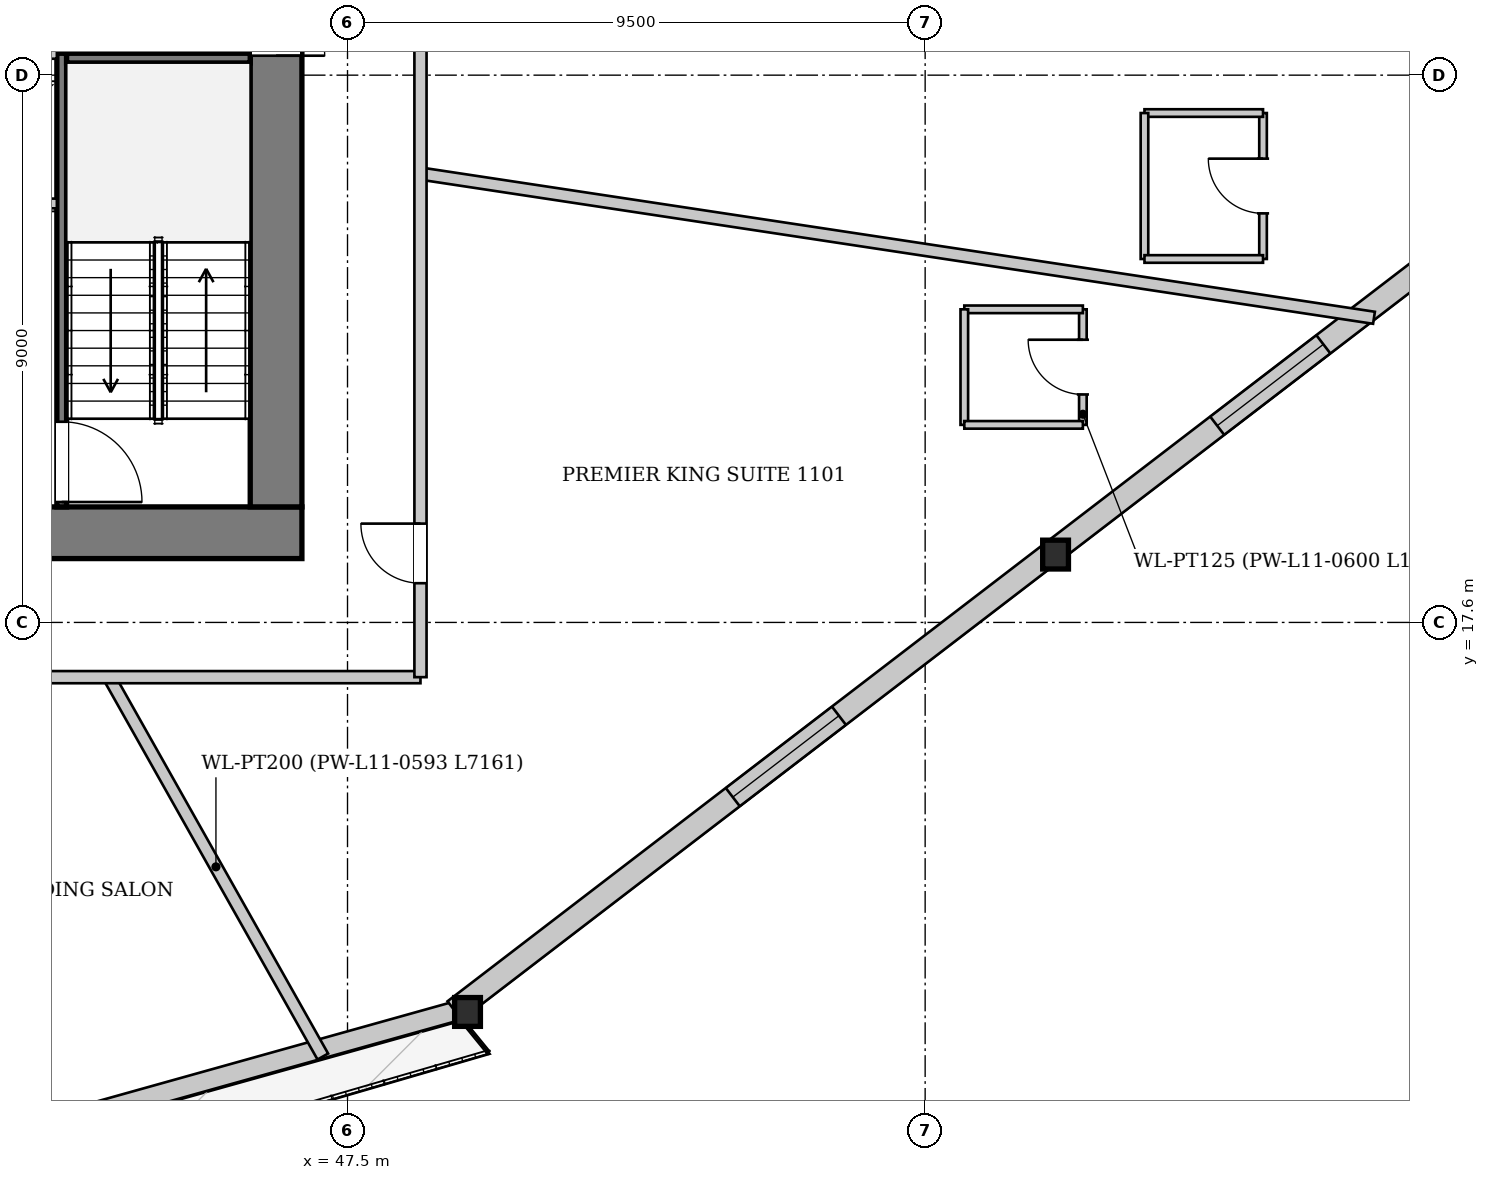
"""IFC4 building model, lengths in metres.
Left out: names, types, materials, properties, quantities, classifications, styles, units other than length and angle.
Written with IfcOpenShell. Run it as: python <this file> out.ifc"""

import sys

from ifc_helpers import new_model, si_unit, direction, frame, frame_2d, origin, origin_2d, place, context, subcontext, project, spatial, rectangle, i_section, extrude, source, transform, mapped, element, fill, save


model = new_model("IFC4")
c1 = context("Model", 3, precision=1e-05, world=origin(), true_north=direction((0.0, 1.0)))
c2 = subcontext(c1, "Body", "Model", "MODEL_VIEW")
j1 = project(units=[si_unit("LENGTHUNIT", "METRE"), si_unit("PLANEANGLEUNIT", "RADIAN")], contexts=[c1])
p1 = place(None, origin())
s1 = spatial("IfcSite", under=j1, at=p1, CompositionType="ELEMENT")
p2 = place(p1, origin())
s2 = spatial("IfcBuilding", under=s1, at=p2, CompositionType="ELEMENT")
p3 = place(p2, frame((0.0, 0.0, 47.05)))
s3 = spatial("IfcBuildingStorey", under=s2, at=p3, CompositionType="ELEMENT", Elevation=47.05)
m1 = source(origin(), c2, "Body", "SweptSolid", [
    extrude(i_section(OverallWidth=0.424, OverallDepth=0.474, WebThickness=0.043, FlangeThickness=0.068, at=origin_2d()), origin(), (0.0, 0.0, 1.0), 3.4),
])
p4 = place(p3, frame((49.376, 11.068, 0.0), z_axis=(0.057730403011, 0.074317123279, 0.995562236003), x_axis=(-0.789721843632, 0.613465084329, 0.0)))
e1 = element("IfcColumn", 1, at=p4, inside=s3, PredefinedType="COLUMN", context=c2, shape_type="MappedRepresentation", body=[
    mapped(m1, transform((0.0, 0.0, 0.0), x_axis=(1.0, 0.0, 0.0), y_axis=(0.0, 1.0, 0.0), z_axis=(0.0, 0.0, 1.0), scale=1.0)),
])
m2 = source(origin(), c2, "Body", "SweptSolid", [
    extrude(i_section(OverallWidth=0.424, OverallDepth=0.474, WebThickness=0.043, FlangeThickness=0.068, at=origin_2d()), origin(), (0.0, 0.0, 1.0), 3.407),
])
p5 = place(p3, frame((59.106, 18.528, 0.0), z_axis=(0.022932240853, 0.110504735609, 0.993610998197), x_axis=(-0.979138604962, 0.203193484817, 0.0)))
e2 = element("IfcColumn", 2, at=p5, inside=s3, PredefinedType="COLUMN", context=c2, shape_type="MappedRepresentation", body=[
    mapped(m2, transform((0.0, 0.0, 0.0), x_axis=(1.0, 0.0, 0.0), y_axis=(0.0, 1.0, 0.0), z_axis=(0.0, 0.0, 1.0), scale=1.0)),
])
p6 = place(p3, frame((49.333, 11.222, 0.0), z_axis=(0.0, 0.0, 1.0), x_axis=(-0.96305403072, -0.269308250734, 0.0)))
e3 = element("IfcWall", 3, at=p6, inside=s3, PredefinedType="SOLIDWALL", context=c2, shape_type="SweptSolid", body=[
    extrude(rectangle(XDim=24.521, YDim=0.32, at=frame_2d((12.261, 0.0))), origin(), (0.0, 0.0, 1.0), 2.592),
])
p7 = place(p6, frame((7.297, 0.0, 0.0)))
e4 = element("IfcOpeningElement", 4, at=p7, cuts=e3, PredefinedType="OPENING", context=c2, shape_type="SweptSolid", body=[
    extrude(rectangle(XDim=1.1, YDim=2.3, at=frame_2d((0.55, 1.15))), frame((0.0, 0.17, 0.0), z_axis=(0.0, -1.0, 0.0), x_axis=(1.0, 0.0, 0.0)), (0.0, 0.0, 1.0), 0.34),
])
p8 = place(p6, frame((17.246, 0.0, 0.272)))
e5 = element("IfcOpeningElement", 5, at=p8, cuts=e3, PredefinedType="OPENING", context=c2, shape_type="SweptSolid", body=[
    extrude(rectangle(XDim=1.8, YDim=2.2, at=frame_2d((0.9, 1.1))), frame((0.0, 0.17, 0.0), z_axis=(0.0, -1.0, 0.0), x_axis=(1.0, 0.0, 0.0)), (0.0, 0.0, 1.0), 0.34),
])
p9 = place(p3, frame((68.72, 26.138, 0.0), z_axis=(0.0, 0.0, 1.0), x_axis=(-0.793606361292, -0.608431543657, 0.0)))
e6 = element("IfcWall", 6, at=p9, inside=s3, PredefinedType="SOLIDWALL", context=c2, shape_type="SweptSolid", body=[
    extrude(rectangle(XDim=24.521, YDim=0.38, at=frame_2d((12.261, 0.0))), origin(), (0.0, 0.0, 1.0), 2.592),
])
p10 = place(p9, frame((6.516, 0.0, 0.222)))
e7 = element("IfcOpeningElement", 7, at=p10, cuts=e6, PredefinedType="OPENING", context=c2, shape_type="SweptSolid", body=[
    extrude(rectangle(XDim=2.2, YDim=2.25, at=frame_2d((1.1, 1.125))), frame((0.0, 0.2, 0.0), z_axis=(0.0, -1.0, 0.0), x_axis=(1.0, 0.0, 0.0)), (0.0, 0.0, 1.0), 0.4),
])
p11 = place(p9, frame((16.555, 0.0, 0.222)))
e8 = element("IfcOpeningElement", 8, at=p11, cuts=e6, PredefinedType="OPENING", context=c2, shape_type="SweptSolid", body=[
    extrude(rectangle(XDim=2.2, YDim=2.25, at=frame_2d((1.1, 1.125))), frame((0.0, 0.2, 0.0), z_axis=(0.0, -1.0, 0.0), x_axis=(1.0, 0.0, 0.0)), (0.0, 0.0, 1.0), 0.4),
])
p12 = place(p3, frame((46.75, 19.075, 0.0), z_axis=(0.0, 0.0, 1.0), x_axis=(-1.0, 0.0, 0.0)))
e9 = element("IfcWall", 9, at=p12, inside=s3, PredefinedType="SHEAR", context=c2, shape_type="SweptSolid", body=[
    extrude(rectangle(XDim=17.5, YDim=0.85, at=frame_2d((8.75, 0.0))), origin(), (0.0, 0.0, 1.0), 3.3),
])
p13 = place(p12, frame((4.95, 0.0, 0.0)))
e10 = element("IfcOpeningElement", 10, at=p13, cuts=e9, PredefinedType="OPENING", context=c2, shape_type="SweptSolid", body=[
    extrude(rectangle(XDim=1.12, YDim=2.25, at=frame_2d((0.56, 1.125))), frame((0.0, 0.435, 0.0), z_axis=(0.0, -1.0, 0.0), x_axis=(1.0, 0.0, 0.0)), (0.0, 0.0, 1.0), 0.87),
])
p14 = place(p12, frame((11.45, 0.0, 0.0)))
e11 = element("IfcOpeningElement", 11, at=p14, cuts=e9, PredefinedType="OPENING", context=c2, shape_type="SweptSolid", body=[
    extrude(rectangle(XDim=1.12, YDim=2.25, at=frame_2d((0.56, 1.125))), frame((0.0, 0.435, 0.0), z_axis=(0.0, -1.0, 0.0), x_axis=(1.0, 0.0, 0.0)), (0.0, 0.0, 1.0), 0.87),
])
p15 = place(p3, frame((46.325, 33.7, 0.0), z_axis=(0.0, 0.0, 1.0), x_axis=(0.0, -1.0, 0.0)))
e12 = element("IfcWall", 12, at=p15, inside=s3, PredefinedType="SHEAR", context=c2, shape_type="SweptSolid", body=[
    extrude(rectangle(XDim=14.2, YDim=0.85, at=frame_2d((7.1, 0.0))), origin(), (0.0, 0.0, 1.0), 3.3),
])
p16 = place(p15, frame((5.18, 0.0, 0.0)))
e13 = element("IfcOpeningElement", 13, at=p16, cuts=e12, PredefinedType="OPENING", context=c2, shape_type="SweptSolid", body=[
    extrude(rectangle(XDim=1.6, YDim=2.2, at=frame_2d((0.8, 1.1))), frame((0.0, 0.435, 0.0), z_axis=(0.0, -1.0, 0.0), x_axis=(1.0, 0.0, 0.0)), (0.0, 0.0, 1.0), 0.87),
])
p17 = place(p3, frame((42.8, 26.96, 0.0), z_axis=(0.0, 0.0, 1.0), x_axis=(0.0, -1.0, 0.0)))
e14 = element("IfcWall", 14, at=p17, inside=s3, PredefinedType="PARTITIONING", context=c2, shape_type="SweptSolid", body=[
    extrude(rectangle(XDim=7.46, YDim=0.16, at=frame_2d((3.73, 0.0))), origin(), (0.0, 0.0, 1.0), 3.3),
])
p18 = place(p17, frame((6.06, 0.0, 0.0)))
e15 = element("IfcOpeningElement", 15, at=p18, cuts=e14, PredefinedType="OPENING", context=c2, shape_type="SweptSolid", body=[
    extrude(rectangle(XDim=1.32, YDim=2.2, at=frame_2d((0.66, 1.1))), frame((0.0, 0.09, 0.0), z_axis=(0.0, -1.0, 0.0), x_axis=(1.0, 0.0, 0.0)), (0.0, 0.0, 1.0), 0.18),
])
p19 = place(p3, frame((42.88, 26.88, 0.0), z_axis=(0.0, 0.0, 1.0), x_axis=(1.0, 0.0, 0.0)))
e16 = element("IfcWall", 16, at=p19, inside=s3, PredefinedType="PARTITIONING", context=c2, shape_type="SweptSolid", body=[
    extrude(rectangle(XDim=3.02, YDim=0.16, at=frame_2d((1.51, 0.0))), origin(), (0.0, 0.0, 1.0), 3.3),
])
p20 = place(p3, frame((33.28, 24.49, 0.0), z_axis=(0.0, 0.0, 1.0), x_axis=(1.0, 0.0, 0.0)))
e17 = element("IfcWall", 17, at=p20, inside=s3, PredefinedType="PARTITIONING", context=c2, shape_type="SweptSolid", body=[
    extrude(rectangle(XDim=9.44, YDim=0.16, at=frame_2d((4.72, 0.0))), origin(), (0.0, 0.0, 1.0), 3.3),
])
p21 = place(p3, frame((33.28, 26.95, 0.0), z_axis=(0.0, 0.0, 1.0), x_axis=(1.0, 0.0, 0.0)))
e18 = element("IfcWall", 18, at=p21, inside=s3, PredefinedType="PARTITIONING", context=c2, shape_type="SweptSolid", body=[
    extrude(rectangle(XDim=9.44, YDim=0.16, at=frame_2d((4.72, 0.0))), origin(), (0.0, 0.0, 1.0), 3.3),
])
p22 = place(p21, frame((0.26, 0.0, 0.0)))
e19 = element("IfcOpeningElement", 19, at=p22, cuts=e18, PredefinedType="OPENING", context=c2, shape_type="SweptSolid", body=[
    extrude(rectangle(XDim=1.1, YDim=2.2, at=frame_2d((0.55, 1.1))), frame((0.0, 0.09, 0.0), z_axis=(0.0, -1.0, 0.0), x_axis=(1.0, 0.0, 0.0)), (0.0, 0.0, 1.0), 0.18),
])
p23 = place(p21, frame((2.01, 0.0, 0.0)))
e20 = element("IfcOpeningElement", 20, at=p23, cuts=e18, PredefinedType="OPENING", context=c2, shape_type="SweptSolid", body=[
    extrude(rectangle(XDim=1.1, YDim=2.2, at=frame_2d((0.55, 1.1))), frame((0.0, 0.09, 0.0), z_axis=(0.0, -1.0, 0.0), x_axis=(1.0, 0.0, 0.0)), (0.0, 0.0, 1.0), 0.18),
])
p24 = place(p21, frame((3.76, 0.0, 0.0)))
e21 = element("IfcOpeningElement", 21, at=p24, cuts=e18, PredefinedType="OPENING", context=c2, shape_type="SweptSolid", body=[
    extrude(rectangle(XDim=1.1, YDim=2.2, at=frame_2d((0.55, 1.1))), frame((0.0, 0.09, 0.0), z_axis=(0.0, -1.0, 0.0), x_axis=(1.0, 0.0, 0.0)), (0.0, 0.0, 1.0), 0.18),
])
p25 = place(p21, frame((5.51, 0.0, 0.0)))
e22 = element("IfcOpeningElement", 22, at=p25, cuts=e18, PredefinedType="OPENING", context=c2, shape_type="SweptSolid", body=[
    extrude(rectangle(XDim=1.1, YDim=2.2, at=frame_2d((0.55, 1.1))), frame((0.0, 0.09, 0.0), z_axis=(0.0, -1.0, 0.0), x_axis=(1.0, 0.0, 0.0)), (0.0, 0.0, 1.0), 0.18),
])
p26 = place(p3, frame((43.578, 16.7, 0.0), z_axis=(0.0, 0.0, 1.0), x_axis=(0.490916627621, -0.871206556865, 0.0)))
e23 = element("IfcWall", 23, at=p26, inside=s3, PredefinedType="PARTITIONING", context=c2, shape_type="SweptSolid", body=[
    extrude(rectangle(XDim=7.161, YDim=0.2, at=frame_2d((3.581, 0.0))), origin(), (0.0, 0.0, 1.0), 3.3),
])
p27 = place(p3, frame((48.7, 24.982, 0.0), z_axis=(0.0, 0.0, 1.0), x_axis=(0.988756783169, -0.149532684514, 0.0)))
e24 = element("IfcWall", 24, at=p27, inside=s3, PredefinedType="PARTITIONING", context=c2, shape_type="SweptSolid", body=[
    extrude(rectangle(XDim=15.86, YDim=0.2, at=frame_2d((7.93, 0.0))), origin(), (0.0, 0.0, 1.0), 3.3),
])
p28 = place(p3, frame((59.594, 20.849, 0.0), z_axis=(0.0, 0.0, 1.0), x_axis=(0.0, 1.0, 0.0)))
e25 = element("IfcWall", 25, at=p28, inside=s3, PredefinedType="PARTITIONING", context=c2, shape_type="SweptSolid", body=[
    extrude(rectangle(XDim=1.9, YDim=0.125, at=frame_2d((0.95, 0.0))), origin(), (0.0, 0.0, 1.0), 3.3),
])
p29 = place(p28, frame((0.5, 0.0, 0.0)))
e26 = element("IfcOpeningElement", 26, at=p29, cuts=e25, PredefinedType="OPENING", context=c2, shape_type="SweptSolid", body=[
    extrude(rectangle(XDim=0.9, YDim=2.1, at=frame_2d((0.45, 1.05))), frame((0.0, 0.073, 0.0), z_axis=(0.0, -1.0, 0.0), x_axis=(1.0, 0.0, 0.0)), (0.0, 0.0, 1.0), 0.145),
])
p30 = place(p3, frame((59.594, 22.749, 0.0), z_axis=(0.0, 0.0, 1.0), x_axis=(-1.0, 0.0, 0.0)))
e27 = element("IfcWall", 27, at=p30, inside=s3, PredefinedType="PARTITIONING", context=c2, shape_type="SweptSolid", body=[
    extrude(rectangle(XDim=1.95, YDim=0.125, at=frame_2d((0.975, 0.0))), origin(), (0.0, 0.0, 1.0), 3.3),
])
p31 = place(p3, frame((57.644, 22.749, 0.0), z_axis=(0.0, 0.0, 1.0), x_axis=(0.0, -1.0, 0.0)))
e28 = element("IfcWall", 28, at=p31, inside=s3, PredefinedType="PARTITIONING", context=c2, shape_type="SweptSolid", body=[
    extrude(rectangle(XDim=1.9, YDim=0.125, at=frame_2d((0.95, 0.0))), origin(), (0.0, 0.0, 1.0), 3.3),
])
p32 = place(p3, frame((57.644, 20.849, 0.0), z_axis=(0.0, 0.0, 1.0), x_axis=(1.0, 0.0, 0.0)))
e29 = element("IfcWall", 29, at=p32, inside=s3, PredefinedType="PARTITIONING", context=c2, shape_type="SweptSolid", body=[
    extrude(rectangle(XDim=1.95, YDim=0.125, at=frame_2d((0.975, 0.0))), origin(), (0.0, 0.0, 1.0), 3.3),
])
p33 = place(p3, frame((62.557, 23.577, 0.0), z_axis=(0.0, 0.0, 1.0), x_axis=(0.0, 1.0, 0.0)))
e30 = element("IfcWall", 30, at=p33, inside=s3, PredefinedType="PARTITIONING", context=c2, shape_type="SweptSolid", body=[
    extrude(rectangle(XDim=2.4, YDim=0.125, at=frame_2d((1.2, 0.0))), origin(), (0.0, 0.0, 1.0), 3.3),
])
p34 = place(p33, frame((0.75, 0.0, 0.0)))
e31 = element("IfcOpeningElement", 31, at=p34, cuts=e30, PredefinedType="OPENING", context=c2, shape_type="SweptSolid", body=[
    extrude(rectangle(XDim=0.9, YDim=2.1, at=frame_2d((0.45, 1.05))), frame((0.0, 0.073, 0.0), z_axis=(0.0, -1.0, 0.0), x_axis=(1.0, 0.0, 0.0)), (0.0, 0.0, 1.0), 0.145),
])
p35 = place(p3, frame((62.557, 25.977, 0.0), z_axis=(0.0, 0.0, 1.0), x_axis=(-1.0, 0.0, 0.0)))
e32 = element("IfcWall", 32, at=p35, inside=s3, PredefinedType="PARTITIONING", context=c2, shape_type="SweptSolid", body=[
    extrude(rectangle(XDim=1.95, YDim=0.125, at=frame_2d((0.975, 0.0))), origin(), (0.0, 0.0, 1.0), 3.3),
])
p36 = place(p3, frame((60.607, 25.977, 0.0), z_axis=(0.0, 0.0, 1.0), x_axis=(0.0, -1.0, 0.0)))
e33 = element("IfcWall", 33, at=p36, inside=s3, PredefinedType="PARTITIONING", context=c2, shape_type="SweptSolid", body=[
    extrude(rectangle(XDim=2.4, YDim=0.125, at=frame_2d((1.2, 0.0))), origin(), (0.0, 0.0, 1.0), 3.3),
])
p37 = place(p3, frame((60.607, 23.577, 0.0), z_axis=(0.0, 0.0, 1.0), x_axis=(1.0, 0.0, 0.0)))
e34 = element("IfcWall", 34, at=p37, inside=s3, PredefinedType="PARTITIONING", context=c2, shape_type="SweptSolid", body=[
    extrude(rectangle(XDim=1.95, YDim=0.125, at=frame_2d((0.975, 0.0))), origin(), (0.0, 0.0, 1.0), 3.3),
])
p38 = place(p3, frame((27.3, 16.7, 0.0), z_axis=(0.0, 0.0, 1.0), x_axis=(1.0, 0.0, 0.0)))
e35 = element("IfcWall", 35, at=p38, inside=s3, PredefinedType="PARTITIONING", context=c2, shape_type="SweptSolid", body=[
    extrude(rectangle(XDim=21.4, YDim=0.2, at=frame_2d((10.7, 0.0))), origin(), (0.0, 0.0, 1.0), 3.3),
])
p39 = place(p38, frame((13.944, 0.0, 0.0)))
e36 = element("IfcOpeningElement", 36, at=p39, cuts=e35, PredefinedType="OPENING", context=c2, shape_type="SweptSolid", body=[
    extrude(rectangle(XDim=0.98, YDim=2.15, at=frame_2d((0.49, 1.075))), frame((0.0, 0.11, 0.0), z_axis=(0.0, -1.0, 0.0), x_axis=(1.0, 0.0, 0.0)), (0.0, 0.0, 1.0), 0.22),
])
p40 = place(p3, frame((48.7, 16.7, 0.0), z_axis=(0.0, 0.0, 1.0), x_axis=(0.0, 1.0, 0.0)))
e37 = element("IfcWall", 37, at=p40, inside=s3, PredefinedType="PARTITIONING", context=c2, shape_type="SweptSolid", body=[
    extrude(rectangle(XDim=19.8, YDim=0.2, at=frame_2d((9.9, 0.0))), origin(), (0.0, 0.0, 1.0), 3.3),
])
p41 = place(p40, frame((1.545, 0.0, 0.0)))
e38 = element("IfcOpeningElement", 38, at=p41, cuts=e37, PredefinedType="OPENING", context=c2, shape_type="SweptSolid", body=[
    extrude(rectangle(XDim=0.98, YDim=2.15, at=frame_2d((0.49, 1.075))), frame((0.0, 0.11, 0.0), z_axis=(0.0, -1.0, 0.0), x_axis=(1.0, 0.0, 0.0)), (0.0, 0.0, 1.0), 0.22),
])
p42 = place(p40, frame((16.237, 0.0, 0.0)))
e39 = element("IfcOpeningElement", 39, at=p42, cuts=e37, PredefinedType="OPENING", context=c2, shape_type="SweptSolid", body=[
    extrude(rectangle(XDim=0.98, YDim=2.15, at=frame_2d((0.49, 1.075))), frame((0.0, 0.11, 0.0), z_axis=(0.0, -1.0, 0.0), x_axis=(1.0, 0.0, 0.0)), (0.0, 0.0, 1.0), 0.22),
])
m3 = source(origin(), c2, "Body", "SweptSolid", [
    extrude(rectangle(XDim=2.2, YDim=2.25, at=frame_2d((1.1, 1.125))), frame((0.0, 0.03, 0.0), z_axis=(0.0, -1.0, 0.0), x_axis=(1.0, 0.0, 0.0)), (0.0, 0.0, 1.0), 0.06),
])
p43 = place(p10, origin())
e40 = element("IfcWindow", 40, at=p43, inside=s3, PartitioningType="SINGLE_PANEL", PredefinedType="WINDOW", context=c2, shape_type="MappedRepresentation", body=[
    mapped(m3, transform((0.0, 0.0, 0.0), x_axis=(1.0, 0.0, 0.0), y_axis=(0.0, 1.0, 0.0), z_axis=(0.0, 0.0, 1.0), scale=1.0)),
])
fill(e7, e40)
p44 = place(p11, origin())
e41 = element("IfcWindow", 41, at=p44, inside=s3, PartitioningType="SINGLE_PANEL", PredefinedType="WINDOW", context=c2, shape_type="MappedRepresentation", body=[
    mapped(m3, transform((0.0, 0.0, 0.0), x_axis=(1.0, 0.0, 0.0), y_axis=(0.0, 1.0, 0.0), z_axis=(0.0, 0.0, 1.0), scale=1.0)),
])
fill(e8, e41)
m4 = source(origin(), c2, "Body", "SweptSolid", [
    extrude(rectangle(XDim=1.6, YDim=2.2, at=frame_2d((0.8, 1.1))), frame((0.0, 0.025, 0.0), z_axis=(0.0, -1.0, 0.0), x_axis=(1.0, 0.0, 0.0)), (0.0, 0.0, 1.0), 0.05),
])
p45 = place(p16, origin())
e42 = element("IfcDoor", 42, at=p45, inside=s3, OperationType="DOUBLE_DOOR_SINGLE_SWING", PredefinedType="DOOR", context=c2, shape_type="MappedRepresentation", body=[
    mapped(m4, transform((0.0, 0.0, 0.0), x_axis=(1.0, 0.0, 0.0), y_axis=(0.0, 1.0, 0.0), z_axis=(0.0, 0.0, 1.0), scale=1.0)),
])
fill(e13, e42)
m5 = source(origin(), c2, "Body", "SweptSolid", [
    extrude(rectangle(XDim=1.32, YDim=2.2, at=frame_2d((0.66, 1.1))), frame((0.0, 0.025, 0.0), z_axis=(0.0, -1.0, 0.0), x_axis=(1.0, 0.0, 0.0)), (0.0, 0.0, 1.0), 0.05),
])
p46 = place(p18, origin())
e43 = element("IfcDoor", 43, at=p46, inside=s3, OperationType="SINGLE_SWING_RIGHT", PredefinedType="DOOR", context=c2, shape_type="MappedRepresentation", body=[
    mapped(m5, transform((0.0, 0.0, 0.0), x_axis=(1.0, 0.0, 0.0), y_axis=(0.0, 1.0, 0.0), z_axis=(0.0, 0.0, 1.0), scale=1.0)),
])
fill(e15, e43)
m6 = source(origin(), c2, "Body", "SweptSolid", [
    extrude(rectangle(XDim=0.9, YDim=2.1, at=frame_2d((0.45, 1.05))), frame((0.0, 0.025, 0.0), z_axis=(0.0, -1.0, 0.0), x_axis=(1.0, 0.0, 0.0)), (0.0, 0.0, 1.0), 0.05),
])
p47 = place(p29, origin())
e44 = element("IfcDoor", 44, at=p47, inside=s3, OperationType="SINGLE_SWING_RIGHT", PredefinedType="DOOR", context=c2, shape_type="MappedRepresentation", body=[
    mapped(m6, transform((0.0, 0.0, 0.0), x_axis=(1.0, 0.0, 0.0), y_axis=(0.0, 1.0, 0.0), z_axis=(0.0, 0.0, 1.0), scale=1.0)),
])
fill(e26, e44)
p48 = place(p34, origin())
e45 = element("IfcDoor", 45, at=p48, inside=s3, OperationType="SINGLE_SWING_RIGHT", PredefinedType="DOOR", context=c2, shape_type="MappedRepresentation", body=[
    mapped(m6, transform((0.0, 0.0, 0.0), x_axis=(1.0, 0.0, 0.0), y_axis=(0.0, 1.0, 0.0), z_axis=(0.0, 0.0, 1.0), scale=1.0)),
])
fill(e31, e45)
m7 = source(origin(), c2, "Body", "SweptSolid", [
    extrude(rectangle(XDim=0.98, YDim=2.15, at=frame_2d((0.49, 1.075))), frame((0.0, 0.025, 0.0), z_axis=(0.0, -1.0, 0.0), x_axis=(1.0, 0.0, 0.0)), (0.0, 0.0, 1.0), 0.05),
])
p49 = place(p41, origin())
e46 = element("IfcDoor", 46, at=p49, inside=s3, OperationType="SINGLE_SWING_RIGHT", PredefinedType="DOOR", context=c2, shape_type="MappedRepresentation", body=[
    mapped(m7, transform((0.0, 0.0, 0.0), x_axis=(1.0, 0.0, 0.0), y_axis=(0.0, 1.0, 0.0), z_axis=(0.0, 0.0, 1.0), scale=1.0)),
])
fill(e38, e46)
save(model, sys.argv[1])
